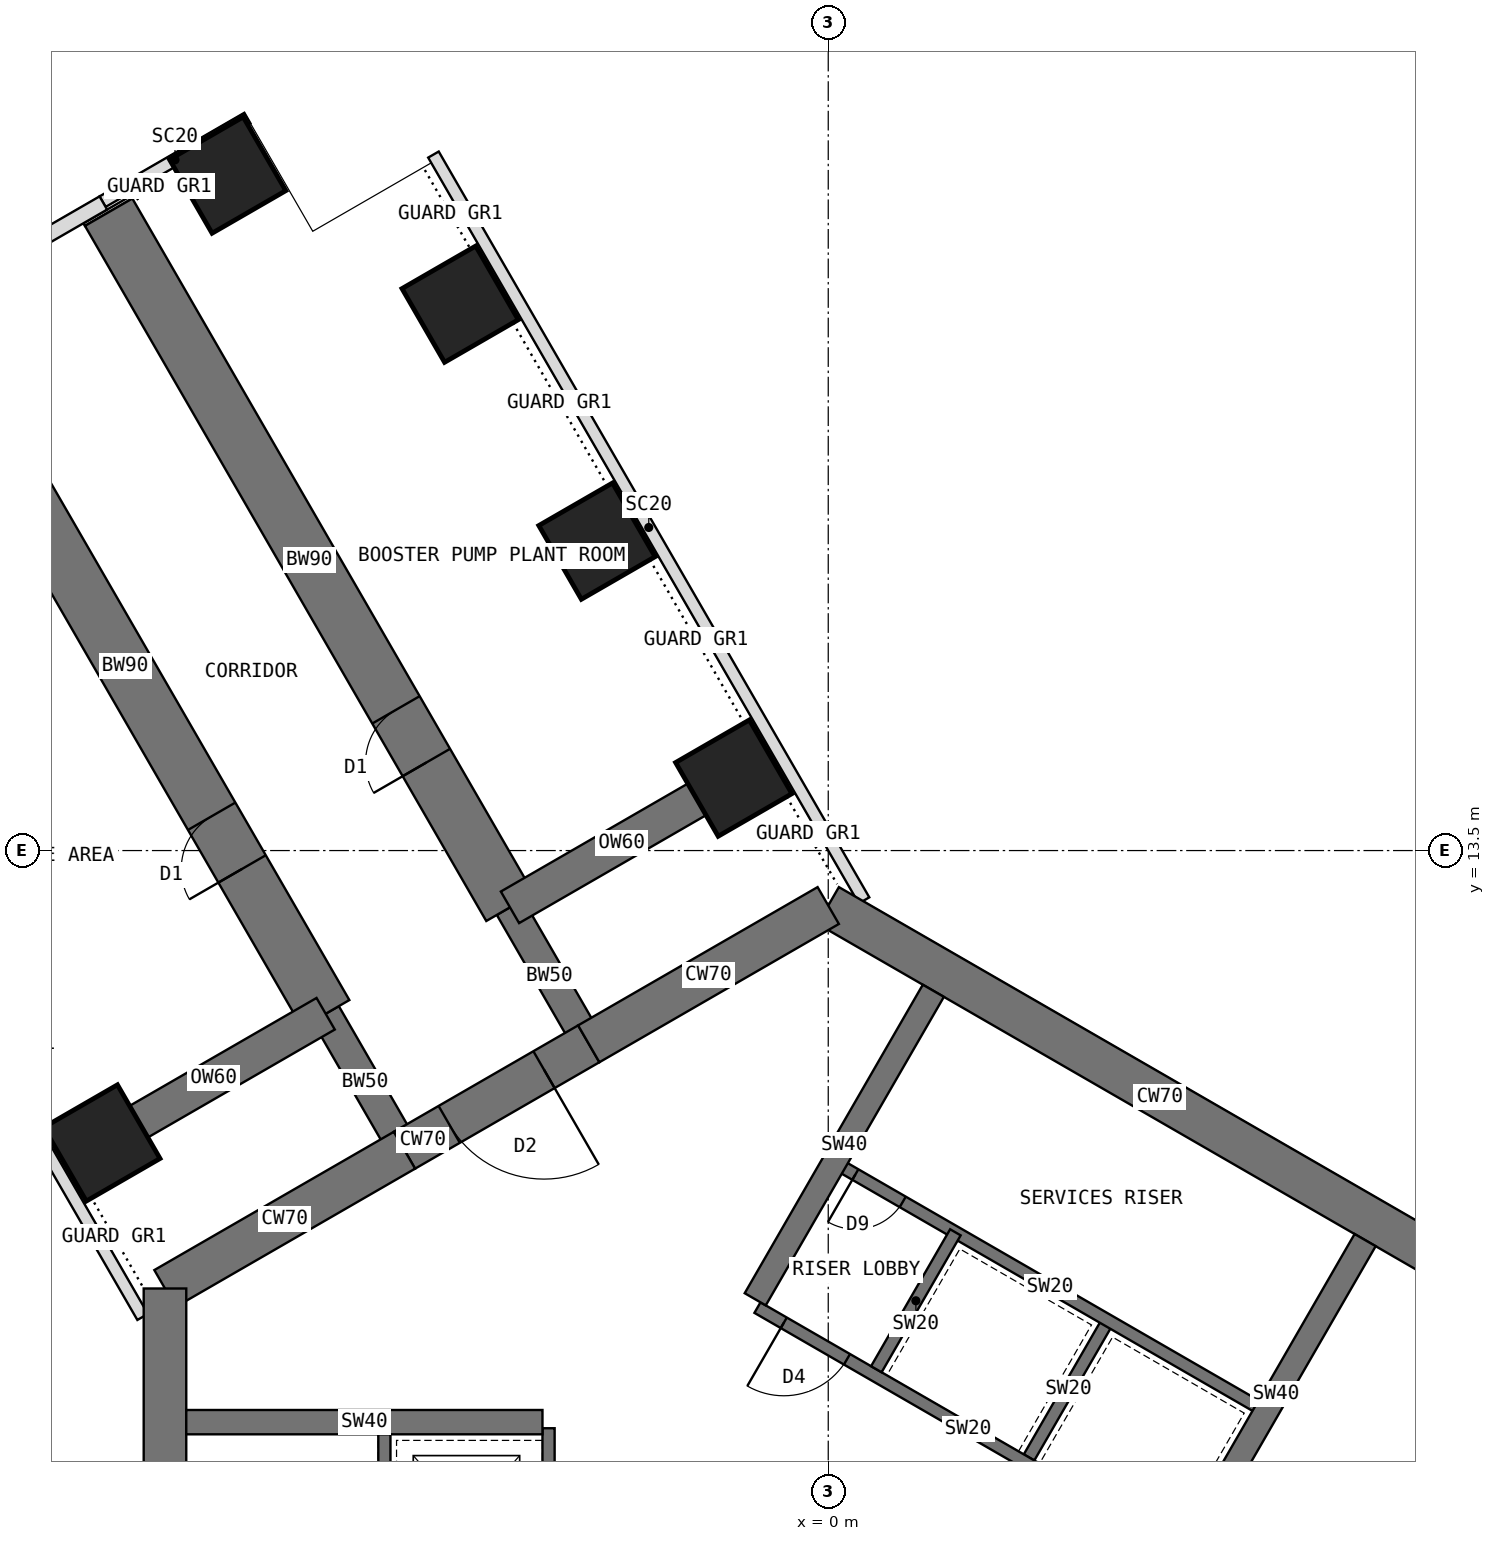
"""IFC4 building model, lengths in metres.
Left out: names, types, materials, properties, quantities, classifications, styles, units other than length and angle.
Written with IfcOpenShell. Run it as: python <this file> out.ifc"""

import sys

from ifc_helpers import new_model, si_unit, direction, frame, frame_2d, origin, origin_2d, place, context, subcontext, project, spatial, rectangle, extrude, element, fill, save


model = new_model("IFC4")
c1 = context("Model", 3, precision=1e-05, world=origin(), true_north=direction((0.0, 1.0)))
c2 = subcontext(c1, "Body", "Model", "MODEL_VIEW")
j1 = project(units=[si_unit("LENGTHUNIT", "METRE"), si_unit("PLANEANGLEUNIT", "RADIAN")], contexts=[c1])
p1 = place(None, origin())
s1 = spatial("IfcSite", under=j1, at=p1, CompositionType="ELEMENT")
p2 = place(p1, origin())
s2 = spatial("IfcBuilding", under=s1, at=p2, CompositionType="ELEMENT")
p3 = place(p2, frame((0.0, 0.0, 92.5)))
s3 = spatial("IfcBuildingStorey", under=s2, at=p3, CompositionType="ELEMENT", Elevation=92.5)
p4 = place(p3, frame((10.908, 6.298, 0.0), z_axis=(0.0, 0.0, 1.0), x_axis=(-0.866021940709, 0.500005998175, 0.0)))
e1 = element("IfcWall", 1, at=p4, inside=s3, PredefinedType="SHEAR", context=c2, shape_type="SweptSolid", body=[
    extrude(rectangle(XDim=12.596, YDim=0.7, at=frame_2d((6.298, 0.0))), origin(), (0.0, 0.0, 1.0), 5.0),
])
p5 = place(p3, frame((0.0, 12.596, 0.0), z_axis=(0.0, 0.0, 1.0), x_axis=(-0.866011268655, -0.500024481964, 0.0)))
e2 = element("IfcWall", 2, at=p5, inside=s3, PredefinedType="SHEAR", context=c2, shape_type="SweptSolid", body=[
    extrude(rectangle(XDim=4.548, YDim=0.7, at=frame_2d((2.274, 0.0))), origin(), (0.0, 0.0, 1.0), 5.0),
])
p6 = place(p3, frame((-3.939, 10.322, 0.0), z_axis=(0.0, 0.0, 1.0), x_axis=(-0.866019471182, -0.500010275428, 0.0)))
e3 = element("IfcWall", 3, at=p6, inside=s3, PredefinedType="SHEAR", context=c2, shape_type="SweptSolid", body=[
    extrude(rectangle(XDim=3.5, YDim=0.7, at=frame_2d((1.75, 0.0))), origin(), (0.0, 0.0, 1.0), 5.0),
])
p7 = place(p6, frame((0.85, 0.0, 0.0)))
e4 = element("IfcOpeningElement", 4, at=p7, cuts=e3, PredefinedType="OPENING", context=c2, shape_type="SweptSolid", body=[
    extrude(rectangle(XDim=1.8, YDim=2.1, at=frame_2d((0.9, 1.05))), frame((0.0, 0.36, 0.0), z_axis=(0.0, -1.0, 0.0), x_axis=(1.0, 0.0, 0.0)), (0.0, 0.0, 1.0), 0.72),
])
p8 = place(p3, frame((-6.97, 8.572, 0.0), z_axis=(0.0, 0.0, 1.0), x_axis=(-0.866034513004, -0.499984222037, 0.0)))
e5 = element("IfcWall", 5, at=p8, inside=s3, PredefinedType="SHEAR", context=c2, shape_type="SweptSolid", body=[
    extrude(rectangle(XDim=4.548, YDim=0.7, at=frame_2d((2.274, 0.0))), origin(), (0.0, 0.0, 1.0), 5.0),
])
p9 = place(p3, frame((-10.908, 6.298, 0.0), z_axis=(0.0, 0.0, 1.0), x_axis=(0.0, -1.0, 0.0)))
e6 = element("IfcWall", 6, at=p9, inside=s3, PredefinedType="SHEAR", context=c2, shape_type="SweptSolid", body=[
    extrude(rectangle(XDim=12.596, YDim=0.7, at=frame_2d((6.298, 0.0))), origin(), (0.0, 0.0, 1.0), 5.0),
])
p10 = place(p3, frame((-6.97, 8.572, 0.0), z_axis=(0.0, 0.0, 1.0), x_axis=(-0.499988811324, 0.866031863473, 0.0)))
e7 = element("IfcWall", 7, at=p10, inside=s3, PredefinedType="SHEAR", context=c2, shape_type="SweptSolid", body=[
    extrude(rectangle(XDim=2.592, YDim=0.5, at=frame_2d((1.296, 0.0))), origin(), (0.0, 0.0, 1.0), 5.0),
])
p11 = place(p3, frame((-8.266, 10.816, 0.0), z_axis=(0.0, 0.0, 1.0), x_axis=(-0.499996231654, 0.866027579429, 0.0)))
e8 = element("IfcWall", 8, at=p11, inside=s3, PredefinedType="SHEAR", context=c2, shape_type="SweptSolid", body=[
    extrude(rectangle(XDim=13.2, YDim=0.9, at=frame_2d((6.6, 0.0))), origin(), (0.0, 0.0, 1.0), 5.0),
])
p12 = place(p11, frame((2.75, 0.0, 0.0)))
e9 = element("IfcOpeningElement", 9, at=p12, cuts=e8, PredefinedType="OPENING", context=c2, shape_type="SweptSolid", body=[
    extrude(rectangle(XDim=1.0, YDim=2.1, at=frame_2d((0.5, 1.05))), frame((0.0, 0.46, 0.0), z_axis=(0.0, -1.0, 0.0), x_axis=(1.0, 0.0, 0.0)), (0.0, 0.0, 1.0), 0.92),
])
p13 = place(p3, frame((-3.939, 10.322, 0.0), z_axis=(0.0, 0.0, 1.0), x_axis=(-0.499918158782, 0.866072649678, 0.0)))
e10 = element("IfcWall", 10, at=p13, inside=s3, PredefinedType="SHEAR", context=c2, shape_type="SweptSolid", body=[
    extrude(rectangle(XDim=2.592, YDim=0.5, at=frame_2d((1.296, 0.0))), origin(), (0.0, 0.0, 1.0), 5.0),
])
p14 = place(p3, frame((-5.234, 12.566, 0.0), z_axis=(0.0, 0.0, 1.0), x_axis=(-0.500010103361, 0.866019570528, 0.0)))
e11 = element("IfcWall", 11, at=p14, inside=s3, PredefinedType="SHEAR", context=c2, shape_type="SweptSolid", body=[
    extrude(rectangle(XDim=13.2, YDim=0.9, at=frame_2d((6.6, 0.0))), origin(), (0.0, 0.0, 1.0), 5.0),
])
p15 = place(p14, frame((2.75, 0.0, 0.0)))
e12 = element("IfcOpeningElement", 12, at=p15, cuts=e11, PredefinedType="OPENING", context=c2, shape_type="SweptSolid", body=[
    extrude(rectangle(XDim=1.0, YDim=2.1, at=frame_2d((0.5, 1.05))), frame((0.0, 0.46, 0.0), z_axis=(0.0, -1.0, 0.0), x_axis=(1.0, 0.0, 0.0)), (0.0, 0.0, 1.0), 0.92),
])
for number, where, z_axis, x_axis in (
    (13, (-11.946, 8.691, 0.0), (0.0, 0.0, 1.0), (0.866, 0.5, 0.0)),
    (14, (-1.554, 14.691, 0.0), (0.0, 0.0, 1.0), (0.866, 0.5, 0.0)),
    (15, (-3.804, 18.588, 0.0), (0.0, 0.0, 1.0), (0.866, 0.5, 0.0)),
    (16, (-6.054, 22.486, 0.0), (0.0, 0.0, 1.0), (0.866, 0.5, 0.0)),
    (17, (-9.877, 24.608, 0.0), (0.0, 0.0, 1.0), (0.866, 0.5, 0.0)),
):
    element("IfcColumn", number, at=place(p3, frame(where, z_axis=z_axis, x_axis=x_axis)), inside=s3, PredefinedType="COLUMN", context=c2, shape_type="SweptSolid", body=[
        extrude(rectangle(XDim=1.4, YDim=1.4, at=origin_2d()), origin(), (0.0, 0.0, 1.0), 5.0),
    ])
for number, where, z_axis, x_axis in (
    (18, (-8.266, 10.816, 0.0), (0.0, 0.0, 1.0), (-0.866, -0.5, 0.0)),
    (19, (-5.234, 12.566, 0.0), (0.0, 0.0, 1.0), (0.866, 0.5, 0.0)),
):
    element("IfcWall", number, at=place(p3, frame(where, z_axis=z_axis, x_axis=x_axis)), inside=s3, PredefinedType="SHEAR", context=c2, shape_type="SweptSolid", body=[
        extrude(rectangle(XDim=4.25, YDim=0.6, at=frame_2d((2.125, 0.0))), origin(), (0.0, 0.0, 1.0), 5.0),
    ])
for number, where, z_axis, x_axis in (
    (20, (-11.276, 5.83, 0.0), (0.0, 0.0, 1.0), (-0.5, 0.866, 0.0)),
    (21, (-6.493, 24.946, 0.0), (0.0, 0.0, 1.0), (0.5, -0.866, 0.0)),
):
    element("IfcWall", number, at=place(p3, frame(where, z_axis=z_axis, x_axis=x_axis)), inside=s3, PredefinedType="USERDEFINED", context=c2, shape_type="SweptSolid", body=[
        extrude(rectangle(XDim=14.163, YDim=0.2, at=frame_2d((7.082, 0.0))), origin(), (0.0, 0.0, 1.0), 4.8),
    ])
p16 = place(p3, frame((-9.553, 25.546, 0.0), z_axis=(0.0, 0.0, 1.0), x_axis=(-0.866027397988, -0.499996545922, 0.0)))
e22 = element("IfcWall", 22, at=p16, inside=s3, PredefinedType="USERDEFINED", context=c2, shape_type="SweptSolid", body=[
    extrude(rectangle(XDim=2.75, YDim=0.2, at=frame_2d((1.375, 0.0))), origin(), (0.0, 0.0, 1.0), 4.8),
])
p17 = place(p3, frame((-11.922, 24.149, 0.0), z_axis=(0.0, 0.0, 1.0), x_axis=(-0.866036909293, -0.499980071345, 0.0)))
e23 = element("IfcWall", 23, at=p17, inside=s3, PredefinedType="STANDARD", context=c2, shape_type="SweptSolid", body=[
    extrude(rectangle(XDim=3.5, YDim=0.25, at=frame_2d((1.75, 0.0))), origin(), (0.0, 0.0, 1.0), 4.8),
])
p18 = place(p3, frame((-11.834, 23.998, 0.0), z_axis=(0.0, 0.0, 1.0), x_axis=(-0.497188445666, 0.867642581652, 0.0)))
e24 = element("IfcWall", 24, at=p18, inside=s3, PredefinedType="PARTITIONING", context=c2, shape_type="SweptSolid", body=[
    extrude(rectangle(XDim=0.05, YDim=0.9, at=frame_2d((0.025, 0.0))), origin(), (0.0, 0.0, 1.0), 4.8),
])
p19 = place(p3, frame((5.764, 1.984, 0.0), z_axis=(0.0, 0.0, 1.0), x_axis=(-0.866026010844, 0.49999894854, 0.0)))
e25 = element("IfcWall", 25, at=p19, inside=s3, PredefinedType="SHEAR", context=c2, shape_type="SweptSolid", body=[
    extrude(rectangle(XDim=8.0, YDim=0.2, at=frame_2d((4.0, 0.0))), origin(), (0.0, 0.0, 1.0), 5.0),
])
p20 = place(p19, frame((6.3, 0.0, 0.0)))
e26 = element("IfcOpeningElement", 26, at=p20, cuts=e25, PredefinedType="OPENING", context=c2, shape_type="SweptSolid", body=[
    extrude(rectangle(XDim=1.2, YDim=2.1, at=frame_2d((0.6, 1.05))), frame((0.0, 0.11, 0.0), z_axis=(0.0, -1.0, 0.0), x_axis=(1.0, 0.0, 0.0)), (0.0, 0.0, 1.0), 0.22),
])
for number, where, z_axis, x_axis in (
    (27, (3.303, 3.52, 0.0), (0.0, 0.0, 1.0), (0.5, 0.866, 0.0)),
    (28, (0.791, 4.97, 0.0), (0.0, 0.0, 1.0), (0.5, 0.866, 0.0)),
):
    element("IfcWall", number, at=place(p3, frame(where, z_axis=z_axis, x_axis=x_axis)), inside=s3, PredefinedType="SHEAR", context=c2, shape_type="SweptSolid", body=[
        extrude(rectangle(XDim=2.6, YDim=0.2, at=frame_2d((1.3, 0.0))), origin(), (0.0, 0.0, 1.0), 5.0),
    ])
p21 = place(p3, frame((7.114, 4.322, 0.0), z_axis=(0.0, 0.0, 1.0), x_axis=(-0.866026010844, 0.49999894854, 0.0)))
e29 = element("IfcWall", 29, at=p21, inside=s3, PredefinedType="SHEAR", context=c2, shape_type="SweptSolid", body=[
    extrude(rectangle(XDim=8.0, YDim=0.2, at=frame_2d((4.0, 0.0))), origin(), (0.0, 0.0, 1.0), 5.0),
])
p22 = place(p21, frame((6.8, 0.0, 0.0)))
e30 = element("IfcOpeningElement", 30, at=p22, cuts=e29, PredefinedType="OPENING", context=c2, shape_type="SweptSolid", body=[
    extrude(rectangle(XDim=0.9, YDim=2.1, at=frame_2d((0.45, 1.05))), frame((0.0, 0.11, 0.0), z_axis=(0.0, -1.0, 0.0), x_axis=(1.0, 0.0, 0.0)), (0.0, 0.0, 1.0), 0.22),
])
for number, where, z_axis, x_axis in (
    (31, (-1.201, 6.12, 0.0), (0.0, 0.0, 1.0), (0.5, 0.866, 0.0)),
    (32, (5.901, 2.02, 0.0), (0.0, 0.0, 1.0), (0.5, 0.866, 0.0)),
):
    element("IfcWall", number, at=place(p3, frame(where, z_axis=z_axis, x_axis=x_axis)), inside=s3, PredefinedType="SHEAR", context=c2, shape_type="SweptSolid", body=[
        extrude(rectangle(XDim=5.858, YDim=0.4, at=frame_2d((2.929, 0.0))), origin(), (0.0, 0.0, 1.0), 5.0),
    ])
p23 = place(p3, frame((-4.6, 4.0, 0.0), z_axis=(0.0, 0.0, 1.0), x_axis=(0.0, -1.0, 0.0)))
e33 = element("IfcWall", 33, at=p23, inside=s3, PredefinedType="SHEAR", context=c2, shape_type="SweptSolid", body=[
    extrude(rectangle(XDim=8.0, YDim=0.2, at=frame_2d((4.0, 0.0))), origin(), (0.0, 0.0, 1.0), 5.0),
])
p24 = place(p23, frame((6.3, 0.0, 0.0)))
e34 = element("IfcOpeningElement", 34, at=p24, cuts=e33, PredefinedType="OPENING", context=c2, shape_type="SweptSolid", body=[
    extrude(rectangle(XDim=1.2, YDim=2.1, at=frame_2d((0.6, 1.05))), frame((0.0, 0.11, 0.0), z_axis=(0.0, -1.0, 0.0), x_axis=(1.0, 0.0, 0.0)), (0.0, 0.0, 1.0), 0.22),
])
p25 = place(p23, frame((0.9, 0.0, 0.0)))
e35 = element("IfcOpeningElement", 35, at=p25, cuts=e33, PredefinedType="OPENING", context=c2, shape_type="SweptSolid", body=[
    extrude(rectangle(XDim=1.1, YDim=2.2, at=frame_2d((0.55, 1.1))), frame((0.0, 0.11, 0.0), z_axis=(0.0, -1.0, 0.0), x_axis=(1.0, 0.0, 0.0)), (0.0, 0.0, 1.0), 0.22),
])
p26 = place(p3, frame((-7.3, 4.0, 0.0), z_axis=(0.0, 0.0, 1.0), x_axis=(0.0, -1.0, 0.0)))
e36 = element("IfcWall", 36, at=p26, inside=s3, PredefinedType="SHEAR", context=c2, shape_type="SweptSolid", body=[
    extrude(rectangle(XDim=8.0, YDim=0.2, at=frame_2d((4.0, 0.0))), origin(), (0.0, 0.0, 1.0), 5.0),
])
p27 = place(p26, frame((6.7, 0.0, 0.0)))
e37 = element("IfcOpeningElement", 37, at=p27, cuts=e36, PredefinedType="OPENING", context=c2, shape_type="SweptSolid", body=[
    extrude(rectangle(XDim=1.1, YDim=2.1, at=frame_2d((0.55, 1.05))), frame((0.0, 0.11, 0.0), z_axis=(0.0, -1.0, 0.0), x_axis=(1.0, 0.0, 0.0)), (0.0, 0.0, 1.0), 0.22),
])
p28 = place(p3, frame((-4.7, 4.1, 0.0), z_axis=(0.0, 0.0, 1.0), x_axis=(-1.0, 0.0, 0.0)))
e38 = element("IfcWall", 38, at=p28, inside=s3, PredefinedType="SHEAR", context=c2, shape_type="SweptSolid", body=[
    extrude(rectangle(XDim=5.858, YDim=0.4, at=frame_2d((2.929, 0.0))), origin(), (0.0, 0.0, 1.0), 5.0),
])
p29 = place(p20, origin())
e39 = element("IfcDoor", 39, at=p29, inside=s3, OperationType="SINGLE_SWING_RIGHT", PredefinedType="DOOR", context=c2, shape_type="SweptSolid", body=[
    extrude(rectangle(XDim=1.2, YDim=2.1, at=frame_2d((0.6, 1.05))), frame((0.0, 0.025, 0.0), z_axis=(0.0, -1.0, 0.0), x_axis=(1.0, 0.0, 0.0)), (0.0, 0.0, 1.0), 0.05),
])
fill(e26, e39)
p30 = place(p22, origin())
e40 = element("IfcDoor", 40, at=p30, inside=s3, OperationType="SINGLE_SWING_RIGHT", PredefinedType="DOOR", context=c2, shape_type="SweptSolid", body=[
    extrude(rectangle(XDim=0.9, YDim=2.1, at=frame_2d((0.45, 1.05))), frame((0.0, 0.025, 0.0), z_axis=(0.0, -1.0, 0.0), x_axis=(1.0, 0.0, 0.0)), (0.0, 0.0, 1.0), 0.05),
])
fill(e30, e40)
p31 = place(p7, origin())
e41 = element("IfcDoor", 41, at=p31, inside=s3, OperationType="DOUBLE_DOOR_DOUBLE_SWING", PredefinedType="DOOR", context=c2, shape_type="SweptSolid", body=[
    extrude(rectangle(XDim=1.72, YDim=2.06, at=frame_2d((0.9, 1.03))), frame((0.0, 0.025, 0.0), z_axis=(0.0, -1.0, 0.0), x_axis=(1.0, 0.0, 0.0)), (0.0, 0.0, 1.0), 0.05),
    extrude(rectangle(XDim=0.04, YDim=2.1, at=frame_2d((0.02, 1.05))), frame((0.0, 0.35, 0.0), z_axis=(0.0, -1.0, 0.0), x_axis=(1.0, 0.0, 0.0)), (0.0, 0.0, 1.0), 0.699),
    extrude(rectangle(XDim=0.04, YDim=2.1, at=frame_2d((1.78, 1.05))), frame((0.0, 0.35, 0.0), z_axis=(0.0, -1.0, 0.0), x_axis=(1.0, 0.0, 0.0)), (0.0, 0.0, 1.0), 0.699),
    extrude(rectangle(XDim=1.72, YDim=0.04, at=frame_2d((0.9, 2.08))), frame((0.0, 0.35, 0.0), z_axis=(0.0, -1.0, 0.0), x_axis=(1.0, 0.0, 0.0)), (0.0, 0.0, 1.0), 0.699),
])
fill(e4, e41)
p32 = place(p12, origin())
e42 = element("IfcDoor", 42, at=p32, inside=s3, OperationType="SINGLE_SWING_LEFT", PredefinedType="DOOR", context=c2, shape_type="SweptSolid", body=[
    extrude(rectangle(XDim=0.92, YDim=2.06, at=frame_2d((0.5, 1.03))), frame((0.0, 0.025, 0.0), z_axis=(0.0, -1.0, 0.0), x_axis=(1.0, 0.0, 0.0)), (0.0, 0.0, 1.0), 0.05),
    extrude(rectangle(XDim=0.04, YDim=2.1, at=frame_2d((0.02, 1.05))), frame((0.0, 0.45, 0.0), z_axis=(0.0, -1.0, 0.0), x_axis=(1.0, 0.0, 0.0)), (0.0, 0.0, 1.0), 0.899),
    extrude(rectangle(XDim=0.04, YDim=2.1, at=frame_2d((0.98, 1.05))), frame((0.0, 0.45, 0.0), z_axis=(0.0, -1.0, 0.0), x_axis=(1.0, 0.0, 0.0)), (0.0, 0.0, 1.0), 0.899),
    extrude(rectangle(XDim=0.92, YDim=0.04, at=frame_2d((0.5, 2.08))), frame((0.0, 0.45, 0.0), z_axis=(0.0, -1.0, 0.0), x_axis=(1.0, 0.0, 0.0)), (0.0, 0.0, 1.0), 0.899),
])
fill(e9, e42)
p33 = place(p15, origin())
e43 = element("IfcDoor", 43, at=p33, inside=s3, OperationType="SINGLE_SWING_LEFT", PredefinedType="DOOR", context=c2, shape_type="SweptSolid", body=[
    extrude(rectangle(XDim=0.92, YDim=2.06, at=frame_2d((0.5, 1.03))), frame((0.0, 0.025, 0.0), z_axis=(0.0, -1.0, 0.0), x_axis=(1.0, 0.0, 0.0)), (0.0, 0.0, 1.0), 0.05),
    extrude(rectangle(XDim=0.04, YDim=2.1, at=frame_2d((0.02, 1.05))), frame((0.0, 0.45, 0.0), z_axis=(0.0, -1.0, 0.0), x_axis=(1.0, 0.0, 0.0)), (0.0, 0.0, 1.0), 0.899),
    extrude(rectangle(XDim=0.04, YDim=2.1, at=frame_2d((0.98, 1.05))), frame((0.0, 0.45, 0.0), z_axis=(0.0, -1.0, 0.0), x_axis=(1.0, 0.0, 0.0)), (0.0, 0.0, 1.0), 0.899),
    extrude(rectangle(XDim=0.92, YDim=0.04, at=frame_2d((0.5, 2.08))), frame((0.0, 0.45, 0.0), z_axis=(0.0, -1.0, 0.0), x_axis=(1.0, 0.0, 0.0)), (0.0, 0.0, 1.0), 0.899),
])
fill(e12, e43)
save(model, sys.argv[1])
